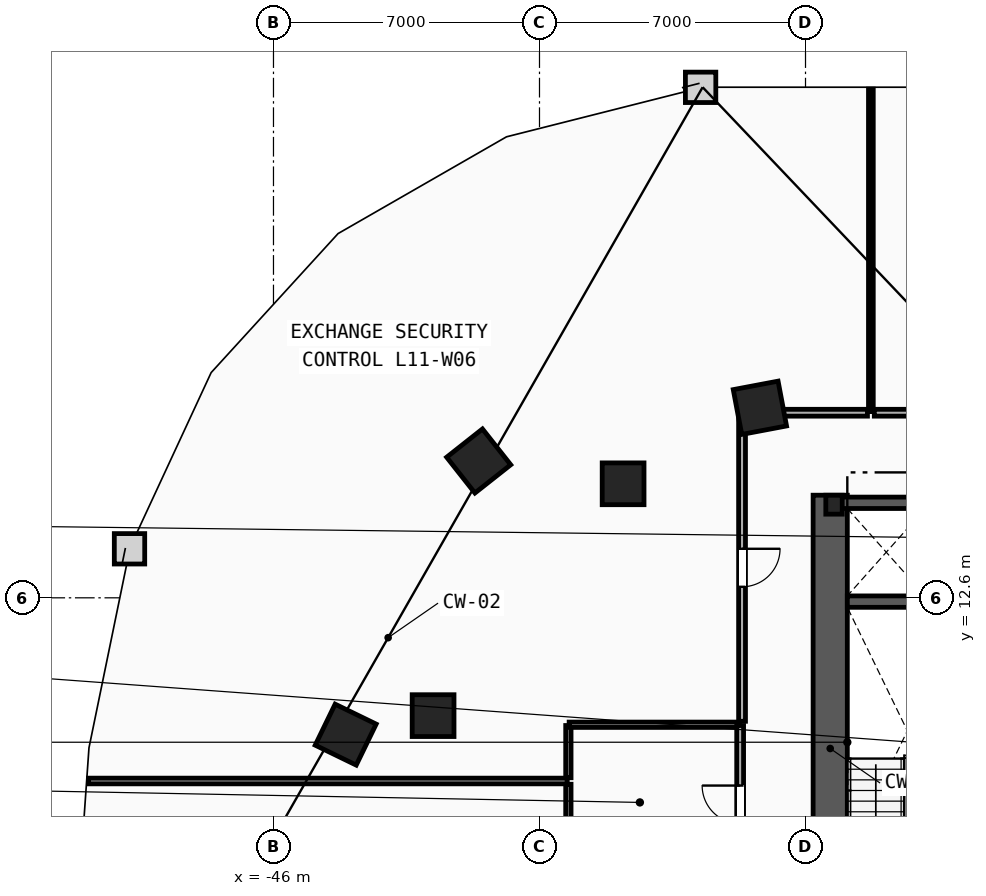
"""IFC4 building model, lengths in metres.
Left out: names, types, materials, properties, quantities, classifications, styles, units other than length and angle.
Written with IfcOpenShell. Run it as: python <this file> out.ifc"""

import sys

from ifc_helpers import new_model, si_unit, direction, frame, frame_2d, origin, origin_2d, place, context, subcontext, project, spatial, rectangle, i_section, extrude, element, fill, save


model = new_model("IFC4")
c1 = context("Model", 3, precision=1e-05, world=origin(), true_north=direction((0.0, 1.0)))
c2 = subcontext(c1, "Body", "Model", "MODEL_VIEW")
j1 = project(units=[si_unit("LENGTHUNIT", "METRE"), si_unit("PLANEANGLEUNIT", "RADIAN")], contexts=[c1])
p1 = place(None, origin())
s1 = spatial("IfcSite", under=j1, at=p1, CompositionType="ELEMENT")
p2 = place(p1, origin())
s2 = spatial("IfcBuilding", under=s1, at=p2, CompositionType="ELEMENT")
p3 = place(p2, frame((0.0, 0.0, 46.8)))
s3 = spatial("IfcBuildingStorey", under=s2, at=p3, CompositionType="ELEMENT", Elevation=46.8)
p4 = place(p3, frame((-31.25, 15.05, 0.0), z_axis=(0.0, 0.0, 1.0), x_axis=(1.0, 0.0, 0.0)))
e1 = element("IfcColumn", 1, at=p4, inside=s3, PredefinedType="COLUMN", context=c2, shape_type="SweptSolid", body=[
    extrude(i_section(OverallWidth=0.432, OverallDepth=0.498, WebThickness=0.056, FlangeThickness=0.089, FilletRadius=0.018, at=origin_2d()), origin(), (0.0, 0.0, 1.0), 3.8),
])
for number, where, z_axis, x_axis in (
    (2, (-41.8, 9.5, 0.0), (0.0, 0.0, 1.0), (1.0, 0.0, 0.0)),
    (3, (-36.8, 15.6, 0.0), (0.0, 0.0, 1.0), (1.0, 0.0, 0.0)),
):
    element("IfcColumn", number, at=place(p3, frame(where, z_axis=z_axis, x_axis=x_axis)), inside=s3, PredefinedType="COLUMN", context=c2, shape_type="SweptSolid", body=[
        extrude(rectangle(XDim=1.1, YDim=1.1, at=origin_2d()), origin(), (0.0, 0.0, 1.0), 3.8),
    ])
for number, where, z_axis, x_axis in (
    (4, (-33.2, 17.6, 0.0), (0.0, 0.0, 1.0), (-0.983, -0.186, 0.0)),
    (5, (-40.6, 16.2, 0.0), (0.0, 0.0, 1.0), (-0.785, -0.619, 0.0)),
    (6, (-44.1, 9.0, 0.0), (0.0, 0.0, 1.0), (-0.437, -0.899, 0.0)),
):
    element("IfcColumn", number, at=place(p3, frame(where, z_axis=z_axis, x_axis=x_axis)), inside=s3, PredefinedType="COLUMN", context=c2, shape_type="SweptSolid", body=[
        extrude(rectangle(XDim=1.2, YDim=1.2, at=origin_2d()), origin(), (0.0, 0.0, 1.0), 3.8),
    ])
p5 = place(p3, frame((-31.35, 1.97, 0.0), z_axis=(0.0, 0.0, 1.0), x_axis=(0.0, 1.0, 0.0)))
e7 = element("IfcWall", 7, at=p5, inside=s3, PredefinedType="SHEAR", context=c2, shape_type="SweptSolid", body=[
    extrude(rectangle(XDim=13.33, YDim=0.9, at=frame_2d((6.665, 0.0))), origin(), (0.0, 0.0, 1.0), 3.5),
])
p6 = place(p3, frame((-30.9, 12.5, 0.0), z_axis=(0.0, 0.0, 1.0), x_axis=(1.0, 0.0, 0.0)))
e8 = element("IfcWall", 8, at=p6, inside=s3, PredefinedType="SHEAR", context=c2, shape_type="SweptSolid", body=[
    extrude(rectangle(XDim=3.16, YDim=0.3, at=frame_2d((1.58, 0.0))), origin(), (0.0, 0.0, 1.0), 3.5),
])
p7 = place(p3, frame((-31.2, 15.1, 0.0), z_axis=(0.0, 0.0, 1.0), x_axis=(1.0, 0.0, 0.0)))
e9 = element("IfcWall", 9, at=p7, inside=s3, PredefinedType="SHEAR", context=c2, shape_type="SweptSolid", body=[
    extrude(rectangle(XDim=2.5, YDim=0.3, at=frame_2d((1.25, 0.0))), origin(), (0.0, 0.0, 1.0), 3.5),
])
p8 = place(p3, frame((-38.24, 5.065, 0.0), z_axis=(0.0, 0.0, 1.0), x_axis=(0.0, 1.0, 0.0)))
e10 = element("IfcWall", 10, at=p8, inside=s3, PredefinedType="PARTITIONING", context=c2, shape_type="SweptSolid", body=[
    extrude(rectangle(XDim=2.63, YDim=0.14, at=frame_2d((1.315, 0.0))), origin(), (0.0, 0.0, 1.0), 3.5),
])
p9 = place(p3, frame((-38.24, 7.865, 0.0), z_axis=(0.0, 0.0, 1.0), x_axis=(0.0, 1.0, 0.0)))
e11 = element("IfcWall", 11, at=p9, inside=s3, PredefinedType="PARTITIONING", context=c2, shape_type="SweptSolid", body=[
    extrude(rectangle(XDim=1.375, YDim=0.14, at=frame_2d((0.688, 0.0))), origin(), (0.0, 0.0, 1.0), 3.5),
])
p10 = place(p3, frame((-38.22, 9.26, 0.0), z_axis=(0.0, 0.0, 1.0), x_axis=(1.0, 0.0, 0.0)))
e12 = element("IfcWall", 12, at=p10, inside=s3, PredefinedType="PARTITIONING", context=c2, shape_type="SweptSolid", body=[
    extrude(rectangle(XDim=4.48, YDim=0.14, at=frame_2d((2.24, 0.0))), origin(), (0.0, 0.0, 1.0), 3.5),
])
p11 = place(p3, frame((-33.72, 5.08, 0.0), z_axis=(0.0, 0.0, 1.0), x_axis=(0.0, 1.0, 0.0)))
e13 = element("IfcWall", 13, at=p11, inside=s3, PredefinedType="PARTITIONING", context=c2, shape_type="SweptSolid", body=[
    extrude(rectangle(XDim=4.16, YDim=0.18, at=frame_2d((2.08, 0.0))), origin(), (0.0, 0.0, 1.0), 3.5),
])
p12 = place(p11, frame((1.58, 0.0, 0.0)))
e14 = element("IfcOpeningElement", 14, at=p12, cuts=e13, PredefinedType="OPENING", context=c2, shape_type="SweptSolid", body=[
    extrude(rectangle(XDim=1.0, YDim=2.15, at=frame_2d((0.5, 1.075))), frame((0.0, 0.1, 0.0), z_axis=(0.0, -1.0, 0.0), x_axis=(1.0, 0.0, 0.0)), (0.0, 0.0, 1.0), 0.2),
])
p13 = place(p3, frame((-50.866, 7.78, 0.0), z_axis=(0.0, 0.0, 1.0), x_axis=(1.0, 0.0, 0.0)))
e15 = element("IfcWall", 15, at=p13, inside=s3, PredefinedType="PARTITIONING", context=c2, shape_type="SweptSolid", body=[
    extrude(rectangle(XDim=12.596, YDim=0.15, at=frame_2d((6.298, 0.0))), origin(), (0.0, 0.0, 1.0), 3.5),
])
p14 = place(p3, frame((-30.28, 17.5, 0.0), z_axis=(0.0, 0.0, 1.0), x_axis=(0.0, 1.0, 0.0)))
e16 = element("IfcWall", 16, at=p14, inside=s3, PredefinedType="PARTITIONING", context=c2, shape_type="SweptSolid", body=[
    extrude(rectangle(XDim=8.485, YDim=0.125, at=frame_2d((4.243, 0.0))), origin(), (0.0, 0.0, 1.0), 3.5),
])
p15 = place(p3, frame((-16.822, 17.47, 0.0), z_axis=(0.0, 0.0, 1.0), x_axis=(-1.0, 0.0, 0.0)))
e17 = element("IfcWall", 17, at=p15, inside=s3, PredefinedType="PARTITIONING", context=c2, shape_type="SweptSolid", body=[
    extrude(rectangle(XDim=13.368, YDim=0.18, at=frame_2d((6.684, 0.0))), origin(), (0.0, 0.0, 1.0), 3.5),
])
p16 = place(p3, frame((-33.67, 17.428, 0.0), z_axis=(0.0, 0.0, 1.0), x_axis=(0.0, -1.0, 0.0)))
e18 = element("IfcWall", 18, at=p16, inside=s3, PredefinedType="PARTITIONING", context=c2, shape_type="SweptSolid", body=[
    extrude(rectangle(XDim=8.077, YDim=0.18, at=frame_2d((4.039, 0.0))), origin(), (0.0, 0.0, 1.0), 3.5),
])
p17 = place(p16, frame((3.539, 0.0, 0.0)))
e19 = element("IfcOpeningElement", 19, at=p17, cuts=e18, PredefinedType="OPENING", context=c2, shape_type="SweptSolid", body=[
    extrude(rectangle(XDim=1.0, YDim=2.15, at=frame_2d((0.5, 1.075))), frame((0.0, 0.1, 0.0), z_axis=(0.0, -1.0, 0.0), x_axis=(1.0, 0.0, 0.0)), (0.0, 0.0, 1.0), 0.2),
])
p18 = place(p3, frame((-30.37, 17.47, 0.0), z_axis=(0.0, 0.0, 1.0), x_axis=(-1.0, 0.0, 0.0)))
e20 = element("IfcWall", 20, at=p18, inside=s3, PredefinedType="PARTITIONING", context=c2, shape_type="SweptSolid", body=[
    extrude(rectangle(XDim=3.258, YDim=0.18, at=frame_2d((1.629, 0.0))), origin(), (0.0, 0.0, 1.0), 3.5),
])
p19 = place(p17, origin())
e21 = element("IfcDoor", 21, at=p19, inside=s3, OperationType="SINGLE_SWING_LEFT", PredefinedType="DOOR", context=c2, shape_type="SweptSolid", body=[
    extrude(rectangle(XDim=1.0, YDim=2.15, at=frame_2d((0.5, 1.075))), frame((0.0, 0.025, 0.0), z_axis=(0.0, -1.0, 0.0), x_axis=(1.0, 0.0, 0.0)), (0.0, 0.0, 1.0), 0.05),
])
fill(e19, e21)
p20 = place(p12, origin())
e22 = element("IfcDoor", 22, at=p20, inside=s3, OperationType="SINGLE_SWING_RIGHT", PredefinedType="DOOR", context=c2, shape_type="SweptSolid", body=[
    extrude(rectangle(XDim=1.0, YDim=2.15, at=frame_2d((0.5, 1.075))), frame((0.0, 0.025, 0.0), z_axis=(0.0, -1.0, 0.0), x_axis=(1.0, 0.0, 0.0)), (0.0, 0.0, 1.0), 0.05),
])
fill(e14, e22)
save(model, sys.argv[1])
